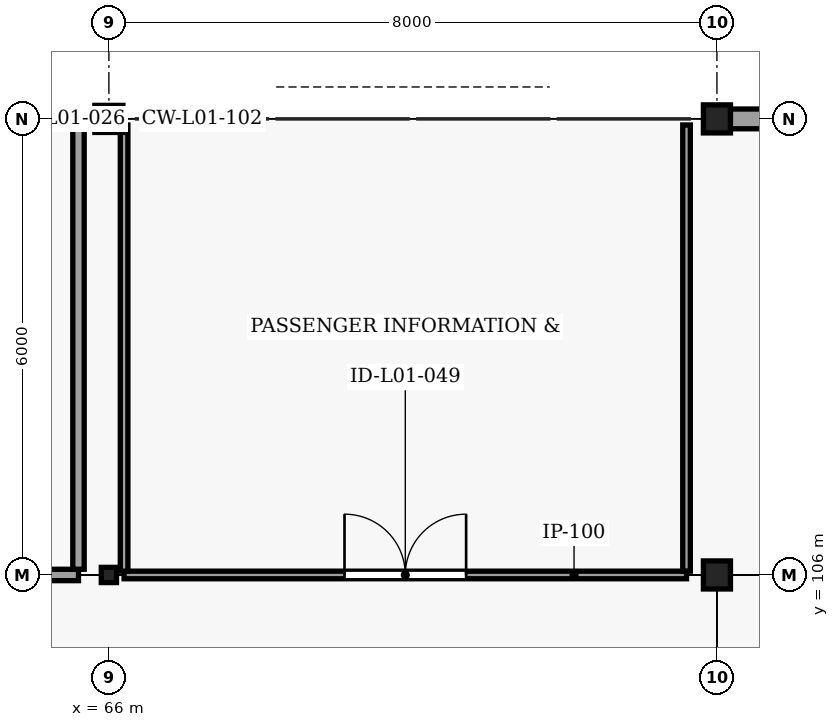
"""IFC4 building model, lengths in metres.
Left out: names, types, materials, properties, quantities, classifications, styles, units other than length and angle.
Written with IfcOpenShell. Run it as: python <this file> out.ifc"""

import sys

from ifc_helpers import new_model, si_unit, direction, frame, frame_2d, origin, origin_2d, place, context, subcontext, project, spatial, rectangle, hollow_rectangle, i_section, extrude, element, fill, save


model = new_model("IFC4")
c1 = context("Model", 3, precision=1e-05, world=origin(), true_north=direction((0.0, 1.0)))
c2 = subcontext(c1, "Body", "Model", "MODEL_VIEW")
j1 = project(units=[si_unit("LENGTHUNIT", "METRE"), si_unit("PLANEANGLEUNIT", "RADIAN")], contexts=[c1])
p1 = place(None, origin())
s1 = spatial("IfcSite", under=j1, at=p1, CompositionType="ELEMENT")
p2 = place(p1, origin())
s2 = spatial("IfcBuilding", under=s1, at=p2, CompositionType="ELEMENT")
p3 = place(p2, origin())
s3 = spatial("IfcBuildingStorey", under=s2, at=p3, CompositionType="ELEMENT", Elevation=0.0)
p4 = place(p3, frame((66.0, 106.0, -0.45), z_axis=(0.0, 0.0, 1.0), x_axis=(1.0, 0.0, 0.0)))
e1 = element("IfcColumn", 1, at=p4, inside=s3, PredefinedType="COLUMN", context=c2, shape_type="SweptSolid", body=[
    extrude(hollow_rectangle(XDim=0.2, YDim=0.2, WallThickness=0.01, InnerFilletRadius=0.01, OuterFilletRadius=0.02, at=origin_2d()), origin(), (0.0, 0.0, 1.0), 5.57),
])
for number, where, z_axis, x_axis in (
    (2, (74.0, 106.0, -0.45), (0.0, 0.0, 1.0), (0.0, 1.0, 0.0)),
    (3, (66.0, 112.0, -0.45), (0.0, 0.0, 1.0), (1.0, 0.0, 0.0)),
    (4, (74.0, 112.0, -0.45), (0.0, 0.0, 1.0), (0.0, 1.0, 0.0)),
):
    element("IfcColumn", number, at=place(p3, frame(where, z_axis=z_axis, x_axis=x_axis)), inside=s3, PredefinedType="COLUMN", context=c2, shape_type="SweptSolid", body=[
        extrude(i_section(OverallWidth=0.369, OverallDepth=0.356, WebThickness=0.011, FlangeThickness=0.018, FilletRadius=0.015, at=origin_2d()), origin(), (0.0, 0.0, 1.0), 5.57),
    ])
p5 = place(p3, frame((58.169, 112.0, 0.0), z_axis=(0.0, 0.0, 1.0), x_axis=(1.0, 0.0, 0.0)))
e5 = element("IfcWall", 5, at=p5, inside=s3, PredefinedType="SOLIDWALL", context=c2, shape_type="SweptSolid", body=[
    extrude(rectangle(XDim=7.661, YDim=0.26, at=frame_2d((3.831, 0.0))), origin(), (0.0, 0.0, 1.0), 4.658),
])
p6 = place(p5, frame((2.631, 0.0, 0.0)))
e6 = element("IfcOpeningElement", 6, at=p6, cuts=e5, PredefinedType="OPENING", context=c2, shape_type="SweptSolid", body=[
    extrude(rectangle(XDim=2.4, YDim=2.4, at=frame_2d((1.2, 1.2))), frame((0.0, 0.14, 0.0), z_axis=(0.0, -1.0, 0.0), x_axis=(1.0, 0.0, 0.0)), (0.0, 0.0, 1.0), 0.28),
])
p7 = place(p5, frame((2.506, 0.0, 3.2)))
e7 = element("IfcOpeningElement", 7, at=p7, cuts=e5, PredefinedType="OPENING", context=c2, shape_type="SweptSolid", body=[
    extrude(rectangle(XDim=2.65, YDim=0.92, at=frame_2d((1.325, 0.46))), frame((0.0, 0.14, 0.0), z_axis=(0.0, -1.0, 0.0), x_axis=(1.0, 0.0, 0.0)), (0.0, 0.0, 1.0), 0.28),
])
p8 = place(p3, frame((74.163, 112.0, 0.0), z_axis=(0.0, 0.0, 1.0), x_axis=(1.0, 0.0, 0.0)))
e8 = element("IfcWall", 8, at=p8, inside=s3, PredefinedType="SOLIDWALL", context=c2, shape_type="SweptSolid", body=[
    extrude(rectangle(XDim=10.018, YDim=0.26, at=frame_2d((5.009, 0.0))), origin(), (0.0, 0.0, 1.0), 4.658),
])
p9 = place(p8, frame((3.637, 0.0, 0.0)))
e9 = element("IfcOpeningElement", 9, at=p9, cuts=e8, PredefinedType="OPENING", context=c2, shape_type="SweptSolid", body=[
    extrude(rectangle(XDim=2.4, YDim=2.4, at=frame_2d((1.2, 1.2))), frame((0.0, 0.14, 0.0), z_axis=(0.0, -1.0, 0.0), x_axis=(1.0, 0.0, 0.0)), (0.0, 0.0, 1.0), 0.28),
])
p10 = place(p8, frame((3.512, 0.0, 3.2)))
e10 = element("IfcOpeningElement", 10, at=p10, cuts=e8, PredefinedType="OPENING", context=c2, shape_type="SweptSolid", body=[
    extrude(rectangle(XDim=2.65, YDim=0.92, at=frame_2d((1.325, 0.46))), frame((0.0, 0.14, 0.0), z_axis=(0.0, -1.0, 0.0), x_axis=(1.0, 0.0, 0.0)), (0.0, 0.0, 1.0), 0.28),
])
p11 = place(p3, frame((56.2, 106.0, 0.0), z_axis=(0.0, 0.0, 1.0), x_axis=(1.0, 0.0, 0.0)))
e11 = element("IfcWall", 11, at=p11, inside=s3, PredefinedType="PARTITIONING", context=c2, shape_type="SweptSolid", body=[
    extrude(rectangle(XDim=9.4, YDim=0.15, at=frame_2d((4.7, 0.0))), origin(), (0.0, 0.0, 1.0), 4.66),
])
p12 = place(p11, frame((3.8, 0.0, 0.0)))
e12 = element("IfcOpeningElement", 12, at=p12, cuts=e11, PredefinedType="OPENING", context=c2, shape_type="SweptSolid", body=[
    extrude(rectangle(XDim=1.8, YDim=2.3, at=frame_2d((0.9, 1.15))), frame((0.0, 0.085, 0.0), z_axis=(0.0, -1.0, 0.0), x_axis=(1.0, 0.0, 0.0)), (0.0, 0.0, 1.0), 0.17),
])
p13 = place(p3, frame((65.6, 106.075, 0.0), z_axis=(0.0, 0.0, 1.0), x_axis=(0.0, 1.0, 0.0)))
e13 = element("IfcWall", 13, at=p13, inside=s3, PredefinedType="PARTITIONING", context=c2, shape_type="SweptSolid", body=[
    extrude(rectangle(XDim=5.845, YDim=0.15, at=frame_2d((2.922, 0.0))), origin(), (0.0, 0.0, 1.0), 4.807),
])
p14 = place(p3, frame((66.2, 106.0, 0.0), z_axis=(0.0, 0.0, 1.0), x_axis=(1.0, 0.0, 0.0)))
e14 = element("IfcWall", 14, at=p14, inside=s3, PredefinedType="MOVABLE", context=c2, shape_type="SweptSolid", body=[
    extrude(rectangle(XDim=7.4, YDim=0.1, at=frame_2d((3.7, 0.0))), origin(), (0.0, 0.0, 1.0), 4.66),
])
p15 = place(p14, frame((2.9, 0.0, 0.0)))
e15 = element("IfcOpeningElement", 15, at=p15, cuts=e14, PredefinedType="OPENING", context=c2, shape_type="SweptSolid", body=[
    extrude(rectangle(XDim=1.6, YDim=2.2, at=frame_2d((0.8, 1.1))), frame((0.0, 0.06, 0.0), z_axis=(0.0, -1.0, 0.0), x_axis=(1.0, 0.0, 0.0)), (0.0, 0.0, 1.0), 0.12),
])
for number, where, z_axis, x_axis in (
    (16, (66.2, 106.05, 0.0), (0.0, 0.0, 1.0), (0.0, 1.0, 0.0)),
    (17, (73.6, 106.05, 0.0), (0.0, 0.0, 1.0), (0.0, 1.0, 0.0)),
):
    element("IfcWall", number, at=place(p3, frame(where, z_axis=z_axis, x_axis=x_axis)), inside=s3, PredefinedType="MOVABLE", context=c2, shape_type="SweptSolid", body=[
        extrude(rectangle(XDim=5.87, YDim=0.1, at=frame_2d((2.935, 0.0))), origin(), (0.0, 0.0, 1.0), 4.66),
    ])
p16 = place(p15, origin())
e18 = element("IfcDoor", 18, at=p16, inside=s3, OperationType="DOUBLE_DOOR_SINGLE_SWING", PredefinedType="DOOR", context=c2, shape_type="SweptSolid", body=[
    extrude(rectangle(XDim=1.6, YDim=2.2, at=frame_2d((0.8, 1.1))), frame((0.0, 0.025, 0.0), z_axis=(0.0, -1.0, 0.0), x_axis=(1.0, 0.0, 0.0)), (0.0, 0.0, 1.0), 0.05),
])
fill(e15, e18)
save(model, sys.argv[1])
